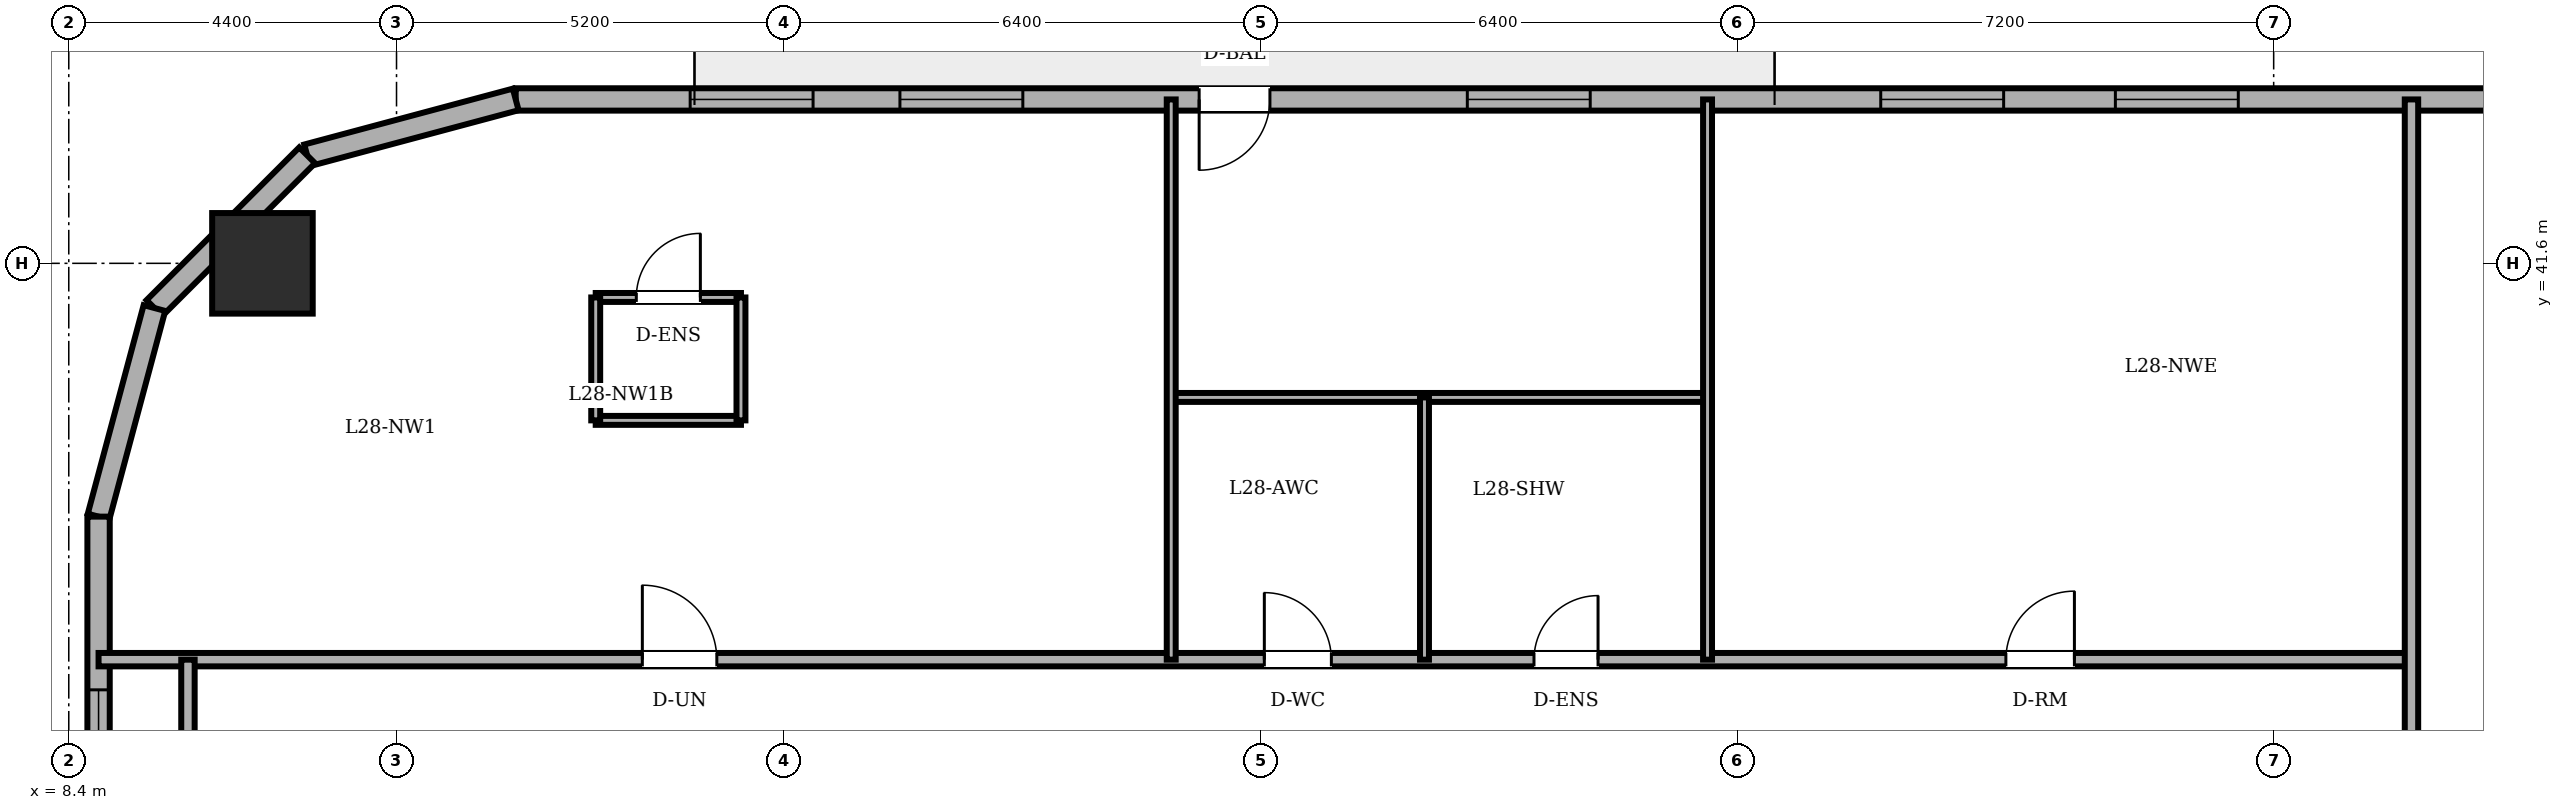
"""IFC4 building model, lengths in metres.
Left out: names, types, materials, properties, quantities, classifications, styles, units other than length and angle.
Written with IfcOpenShell. Run it as: python <this file> out.ifc"""

import sys

from ifc_helpers import new_model, si_unit, direction, frame, frame_2d, origin, origin_2d, place, context, subcontext, project, spatial, rectangle, circle, extrude, element, fill, save


model = new_model("IFC4")
c1 = context("Model", 3, precision=1e-05, world=origin(), true_north=direction((0.0, 1.0)))
c2 = subcontext(c1, "Body", "Model", "MODEL_VIEW")
j1 = project(units=[si_unit("LENGTHUNIT", "METRE"), si_unit("PLANEANGLEUNIT", "RADIAN")], contexts=[c1])
p1 = place(None, origin())
s1 = spatial("IfcSite", under=j1, at=p1, CompositionType="ELEMENT")
p2 = place(p1, origin())
s2 = spatial("IfcBuilding", under=s1, at=p2, CompositionType="ELEMENT")
p3 = place(p2, frame((0.0, 0.0, 107.9)))
s3 = spatial("IfcBuildingStorey", under=s2, at=p3, CompositionType="ELEMENT", Elevation=107.9)
p4 = place(p3, frame((11.0, 41.6, 0.0), z_axis=(0.0, 0.0, 1.0), x_axis=(1.0, 0.0, 0.0)))
e1 = element("IfcColumn", 1, at=p4, inside=s3, PredefinedType="COLUMN", context=c2, shape_type="SweptSolid", body=[
    extrude(circle(Radius=0.675, at=origin_2d()), origin(), (0.0, 0.0, 1.0), 3.6),
])
p5 = place(p3, frame((44.333, 43.8, 0.0), z_axis=(0.0, 0.0, 1.0), x_axis=(-1.0, 0.0, 0.0)))
e2 = element("IfcWall", 2, at=p5, inside=s3, PredefinedType="SOLIDWALL", context=c2, shape_type="SweptSolid", body=[
    extrude(rectangle(XDim=29.933, YDim=0.3, at=frame_2d((14.967, 0.0))), origin(), (0.0, 0.0, 1.0), 3.4),
])
p6 = place(p5, frame((19.808, 0.0, 0.0)))
e3 = element("IfcOpeningElement", 3, at=p6, cuts=e2, PredefinedType="OPENING", context=c2, shape_type="SweptSolid", body=[
    extrude(rectangle(XDim=0.95, YDim=2.2, at=frame_2d((0.475, 1.1))), frame((0.0, 0.16, 0.0), z_axis=(0.0, -1.0, 0.0), x_axis=(1.0, 0.0, 0.0)), (0.0, 0.0, 1.0), 0.32),
])
p7 = place(p5, frame((1.591, 0.0, 0.85)))
e4 = element("IfcOpeningElement", 4, at=p7, cuts=e2, PredefinedType="OPENING", context=c2, shape_type="SweptSolid", body=[
    extrude(rectangle(XDim=1.65, YDim=1.55, at=frame_2d((0.825, 0.775))), frame((0.0, 0.16, 0.0), z_axis=(0.0, -1.0, 0.0), x_axis=(1.0, 0.0, 0.0)), (0.0, 0.0, 1.0), 0.32),
])
p8 = place(p5, frame((6.808, 0.0, 0.85)))
e5 = element("IfcOpeningElement", 5, at=p8, cuts=e2, PredefinedType="OPENING", context=c2, shape_type="SweptSolid", body=[
    extrude(rectangle(XDim=1.65, YDim=1.55, at=frame_2d((0.825, 0.775))), frame((0.0, 0.16, 0.0), z_axis=(0.0, -1.0, 0.0), x_axis=(1.0, 0.0, 0.0)), (0.0, 0.0, 1.0), 0.32),
])
p9 = place(p5, frame((9.958, 0.0, 0.85)))
e6 = element("IfcOpeningElement", 6, at=p9, cuts=e2, PredefinedType="OPENING", context=c2, shape_type="SweptSolid", body=[
    extrude(rectangle(XDim=1.65, YDim=1.55, at=frame_2d((0.825, 0.775))), frame((0.0, 0.16, 0.0), z_axis=(0.0, -1.0, 0.0), x_axis=(1.0, 0.0, 0.0)), (0.0, 0.0, 1.0), 0.32),
])
p10 = place(p5, frame((15.508, 0.0, 0.85)))
e7 = element("IfcOpeningElement", 7, at=p10, cuts=e2, PredefinedType="OPENING", context=c2, shape_type="SweptSolid", body=[
    extrude(rectangle(XDim=1.65, YDim=1.55, at=frame_2d((0.825, 0.775))), frame((0.0, 0.16, 0.0), z_axis=(0.0, -1.0, 0.0), x_axis=(1.0, 0.0, 0.0)), (0.0, 0.0, 1.0), 0.32),
])
p11 = place(p5, frame((23.125, 0.0, 0.85)))
e8 = element("IfcOpeningElement", 8, at=p11, cuts=e2, PredefinedType="OPENING", context=c2, shape_type="SweptSolid", body=[
    extrude(rectangle(XDim=1.65, YDim=1.55, at=frame_2d((0.825, 0.775))), frame((0.0, 0.16, 0.0), z_axis=(0.0, -1.0, 0.0), x_axis=(1.0, 0.0, 0.0)), (0.0, 0.0, 1.0), 0.32),
])
p12 = place(p5, frame((25.941, 0.0, 0.85)))
e9 = element("IfcOpeningElement", 9, at=p12, cuts=e2, PredefinedType="OPENING", context=c2, shape_type="SweptSolid", body=[
    extrude(rectangle(XDim=1.65, YDim=1.55, at=frame_2d((0.825, 0.775))), frame((0.0, 0.16, 0.0), z_axis=(0.0, -1.0, 0.0), x_axis=(1.0, 0.0, 0.0)), (0.0, 0.0, 1.0), 0.32),
])
p13 = place(p3, frame((14.4, 43.8, 0.0), z_axis=(0.0, 0.0, 1.0), x_axis=(-0.965943540406, -0.258752926066, 0.0)))
e10 = element("IfcWall", 10, at=p13, inside=s3, PredefinedType="SOLIDWALL", context=c2, shape_type="SweptSolid", body=[
    extrude(rectangle(XDim=2.898, YDim=0.3, at=frame_2d((1.449, 0.0))), origin(), (0.0, 0.0, 1.0), 3.4),
])
p14 = place(p3, frame((11.6, 43.05, 0.0), z_axis=(0.0, 0.0, 1.0), x_axis=(-0.707106781187, -0.707106781187, 0.0)))
e11 = element("IfcWall", 11, at=p14, inside=s3, PredefinedType="SOLIDWALL", context=c2, shape_type="SweptSolid", body=[
    extrude(rectangle(XDim=2.899, YDim=0.3, at=frame_2d((1.45, 0.0))), origin(), (0.0, 0.0, 1.0), 3.4),
])
p15 = place(p3, frame((9.55, 41.0, 0.0), z_axis=(0.0, 0.0, 1.0), x_axis=(-0.258731875344, -0.96594917914, 0.0)))
e12 = element("IfcWall", 12, at=p15, inside=s3, PredefinedType="SOLIDWALL", context=c2, shape_type="SweptSolid", body=[
    extrude(rectangle(XDim=2.899, YDim=0.3, at=frame_2d((1.449, 0.0))), origin(), (0.0, 0.0, 1.0), 3.4),
])
p16 = place(p3, frame((8.8, 38.2, 0.0), z_axis=(0.0, 0.0, 1.0), x_axis=(0.0, -1.0, 0.0)))
e13 = element("IfcWall", 13, at=p16, inside=s3, PredefinedType="SOLIDWALL", context=c2, shape_type="SweptSolid", body=[
    extrude(rectangle(XDim=28.4, YDim=0.3, at=frame_2d((14.2, 0.0))), origin(), (0.0, 0.0, 1.0), 3.4),
])
p17 = place(p16, frame((2.325, 0.0, 0.85)))
e14 = element("IfcOpeningElement", 14, at=p17, cuts=e13, PredefinedType="OPENING", context=c2, shape_type="SweptSolid", body=[
    extrude(rectangle(XDim=1.65, YDim=1.55, at=frame_2d((0.825, 0.775))), frame((0.0, 0.16, 0.0), z_axis=(0.0, -1.0, 0.0), x_axis=(1.0, 0.0, 0.0)), (0.0, 0.0, 1.0), 0.32),
])
p18 = place(p16, frame((7.328, 0.0, 0.85)))
e15 = element("IfcOpeningElement", 15, at=p18, cuts=e13, PredefinedType="OPENING", context=c2, shape_type="SweptSolid", body=[
    extrude(rectangle(XDim=1.65, YDim=1.55, at=frame_2d((0.825, 0.775))), frame((0.0, 0.16, 0.0), z_axis=(0.0, -1.0, 0.0), x_axis=(1.0, 0.0, 0.0)), (0.0, 0.0, 1.0), 0.32),
])
p19 = place(p16, frame((11.102, 0.0, 0.85)))
e16 = element("IfcOpeningElement", 16, at=p19, cuts=e13, PredefinedType="OPENING", context=c2, shape_type="SweptSolid", body=[
    extrude(rectangle(XDim=1.65, YDim=1.55, at=frame_2d((0.825, 0.775))), frame((0.0, 0.16, 0.0), z_axis=(0.0, -1.0, 0.0), x_axis=(1.0, 0.0, 0.0)), (0.0, 0.0, 1.0), 0.32),
])
p20 = place(p16, frame((17.648, 0.0, 0.85)))
e17 = element("IfcOpeningElement", 17, at=p20, cuts=e13, PredefinedType="OPENING", context=c2, shape_type="SweptSolid", body=[
    extrude(rectangle(XDim=1.65, YDim=1.55, at=frame_2d((0.825, 0.775))), frame((0.0, 0.16, 0.0), z_axis=(0.0, -1.0, 0.0), x_axis=(1.0, 0.0, 0.0)), (0.0, 0.0, 1.0), 0.32),
])
p21 = place(p16, frame((20.422, 0.0, 0.85)))
e18 = element("IfcOpeningElement", 18, at=p21, cuts=e13, PredefinedType="OPENING", context=c2, shape_type="SweptSolid", body=[
    extrude(rectangle(XDim=1.65, YDim=1.55, at=frame_2d((0.825, 0.775))), frame((0.0, 0.16, 0.0), z_axis=(0.0, -1.0, 0.0), x_axis=(1.0, 0.0, 0.0)), (0.0, 0.0, 1.0), 0.32),
])
p22 = place(p16, frame((24.425, 0.0, 0.85)))
e19 = element("IfcOpeningElement", 19, at=p22, cuts=e13, PredefinedType="OPENING", context=c2, shape_type="SweptSolid", body=[
    extrude(rectangle(XDim=1.65, YDim=1.55, at=frame_2d((0.825, 0.775))), frame((0.0, 0.16, 0.0), z_axis=(0.0, -1.0, 0.0), x_axis=(1.0, 0.0, 0.0)), (0.0, 0.0, 1.0), 0.32),
])
p23 = place(p3, frame((15.474, 41.142, 0.0), z_axis=(0.0, 0.0, 1.0), x_axis=(1.0, 0.0, 0.0)))
e20 = element("IfcWall", 20, at=p23, inside=s3, PredefinedType="PARTITIONING", context=c2, shape_type="SweptSolid", body=[
    extrude(rectangle(XDim=1.95, YDim=0.12, at=frame_2d((0.975, 0.0))), origin(), (0.0, 0.0, 1.0), 3.4),
])
p24 = place(p23, frame((0.545, 0.0, 0.0)))
e21 = element("IfcOpeningElement", 21, at=p24, cuts=e20, PredefinedType="OPENING", context=c2, shape_type="SweptSolid", body=[
    extrude(rectangle(XDim=0.86, YDim=2.1, at=frame_2d((0.43, 1.05))), frame((0.0, 0.07, 0.0), z_axis=(0.0, -1.0, 0.0), x_axis=(1.0, 0.0, 0.0)), (0.0, 0.0, 1.0), 0.14),
])
p25 = place(p3, frame((17.424, 39.492, 0.0), z_axis=(0.0, 0.0, 1.0), x_axis=(-1.0, 0.0, 0.0)))
e22 = element("IfcWall", 22, at=p25, inside=s3, PredefinedType="PARTITIONING", context=c2, shape_type="SweptSolid", body=[
    extrude(rectangle(XDim=1.95, YDim=0.12, at=frame_2d((0.975, 0.0))), origin(), (0.0, 0.0, 1.0), 3.4),
])
for number, where, z_axis, x_axis in (
    (23, (15.474, 41.142, 0.0), (0.0, 0.0, 1.0), (0.0, -1.0, 0.0)),
    (24, (17.424, 39.492, 0.0), (0.0, 0.0, 1.0), (0.0, 1.0, 0.0)),
):
    element("IfcWall", number, at=place(p3, frame(where, z_axis=z_axis, x_axis=x_axis)), inside=s3, PredefinedType="PARTITIONING", context=c2, shape_type="SweptSolid", body=[
        extrude(rectangle(XDim=1.65, YDim=0.12, at=frame_2d((0.825, 0.0))), origin(), (0.0, 0.0, 1.0), 3.4),
    ])
p26 = place(p3, frame((8.8, 36.28, 0.0), z_axis=(0.0, 0.0, 1.0), x_axis=(1.0, 0.0, 0.0)))
e25 = element("IfcWall", 25, at=p26, inside=s3, PredefinedType="PARTITIONING", context=c2, shape_type="SweptSolid", body=[
    extrude(rectangle(XDim=31.05, YDim=0.18, at=frame_2d((15.525, 0.0))), origin(), (0.0, 0.0, 1.0), 3.4),
])
p27 = place(p26, frame((15.65, 0.0, 0.0)))
e26 = element("IfcOpeningElement", 26, at=p27, cuts=e25, PredefinedType="OPENING", context=c2, shape_type="SweptSolid", body=[
    extrude(rectangle(XDim=0.9, YDim=2.1, at=frame_2d((0.45, 1.05))), frame((0.0, 0.1, 0.0), z_axis=(0.0, -1.0, 0.0), x_axis=(1.0, 0.0, 0.0)), (0.0, 0.0, 1.0), 0.2),
])
p28 = place(p26, frame((19.27, 0.0, 0.0)))
e27 = element("IfcOpeningElement", 27, at=p28, cuts=e25, PredefinedType="OPENING", context=c2, shape_type="SweptSolid", body=[
    extrude(rectangle(XDim=0.86, YDim=2.1, at=frame_2d((0.43, 1.05))), frame((0.0, 0.1, 0.0), z_axis=(0.0, -1.0, 0.0), x_axis=(1.0, 0.0, 0.0)), (0.0, 0.0, 1.0), 0.2),
])
p29 = place(p26, frame((7.3, 0.0, 0.0)))
e28 = element("IfcOpeningElement", 28, at=p29, cuts=e25, PredefinedType="OPENING", context=c2, shape_type="SweptSolid", body=[
    extrude(rectangle(XDim=1.0, YDim=2.15, at=frame_2d((0.5, 1.075))), frame((0.0, 0.1, 0.0), z_axis=(0.0, -1.0, 0.0), x_axis=(1.0, 0.0, 0.0)), (0.0, 0.0, 1.0), 0.2),
])
p30 = place(p26, frame((25.605, 0.0, 0.0)))
e29 = element("IfcOpeningElement", 29, at=p30, cuts=e25, PredefinedType="OPENING", context=c2, shape_type="SweptSolid", body=[
    extrude(rectangle(XDim=0.92, YDim=2.1, at=frame_2d((0.46, 1.05))), frame((0.0, 0.1, 0.0), z_axis=(0.0, -1.0, 0.0), x_axis=(1.0, 0.0, 0.0)), (0.0, 0.0, 1.0), 0.2),
])
p31 = place(p3, frame((23.2, 39.8, 0.0), z_axis=(0.0, 0.0, 1.0), x_axis=(1.0, 0.0, 0.0)))
e30 = element("IfcWall", 30, at=p31, inside=s3, PredefinedType="PARTITIONING", context=c2, shape_type="SweptSolid", body=[
    extrude(rectangle(XDim=7.2, YDim=0.12, at=frame_2d((3.6, 0.0))), origin(), (0.0, 0.0, 1.0), 3.4),
])
p32 = place(p3, frame((10.0, 33.82, 0.0), z_axis=(0.0, 0.0, 1.0), x_axis=(0.0, 1.0, 0.0)))
e31 = element("IfcWall", 31, at=p32, inside=s3, PredefinedType="PARTITIONING", context=c2, shape_type="SweptSolid", body=[
    extrude(rectangle(XDim=2.46, YDim=0.18, at=frame_2d((1.23, 0.0))), origin(), (0.0, 0.0, 1.0), 3.4),
])
p33 = place(p3, frame((23.2, 36.28, 0.0), z_axis=(0.0, 0.0, 1.0), x_axis=(0.0, 1.0, 0.0)))
e32 = element("IfcWall", 32, at=p33, inside=s3, PredefinedType="PARTITIONING", context=c2, shape_type="SweptSolid", body=[
    extrude(rectangle(XDim=7.52, YDim=0.12, at=frame_2d((3.76, 0.0))), origin(), (0.0, 0.0, 1.0), 3.4),
])
p34 = place(p3, frame((26.6, 36.28, 0.0), z_axis=(0.0, 0.0, 1.0), x_axis=(0.0, 1.0, 0.0)))
e33 = element("IfcWall", 33, at=p34, inside=s3, PredefinedType="PARTITIONING", context=c2, shape_type="SweptSolid", body=[
    extrude(rectangle(XDim=3.52, YDim=0.12, at=frame_2d((1.76, 0.0))), origin(), (0.0, 0.0, 1.0), 3.4),
])
p35 = place(p3, frame((30.4, 36.28, 0.0), z_axis=(0.0, 0.0, 1.0), x_axis=(0.0, 1.0, 0.0)))
e34 = element("IfcWall", 34, at=p35, inside=s3, PredefinedType="PARTITIONING", context=c2, shape_type="SweptSolid", body=[
    extrude(rectangle(XDim=7.52, YDim=0.12, at=frame_2d((3.76, 0.0))), origin(), (0.0, 0.0, 1.0), 3.4),
])
p36 = place(p3, frame((39.85, 25.18, 0.0), z_axis=(0.0, 0.0, 1.0), x_axis=(0.0, 1.0, 0.0)))
e35 = element("IfcWall", 35, at=p36, inside=s3, PredefinedType="PARTITIONING", context=c2, shape_type="SweptSolid", body=[
    extrude(rectangle(XDim=18.62, YDim=0.18, at=frame_2d((9.31, 0.0))), origin(), (0.0, 0.0, 1.0), 3.4),
])
p37 = place(p36, frame((5.35, 0.0, 0.0)))
e36 = element("IfcOpeningElement", 36, at=p37, cuts=e35, PredefinedType="OPENING", context=c2, shape_type="SweptSolid", body=[
    extrude(rectangle(XDim=0.92, YDim=2.1, at=frame_2d((0.46, 1.05))), frame((0.0, 0.1, 0.0), z_axis=(0.0, -1.0, 0.0), x_axis=(1.0, 0.0, 0.0)), (0.0, 0.0, 1.0), 0.2),
])
p38 = place(p6, origin())
e37 = element("IfcDoor", 37, at=p38, inside=s3, OperationType="SINGLE_SWING_RIGHT", PredefinedType="DOOR", context=c2, shape_type="SweptSolid", body=[
    extrude(rectangle(XDim=0.95, YDim=2.2, at=frame_2d((0.475, 1.1))), frame((0.0, 0.025, 0.0), z_axis=(0.0, -1.0, 0.0), x_axis=(1.0, 0.0, 0.0)), (0.0, 0.0, 1.0), 0.05),
])
fill(e3, e37)
p39 = place(p8, origin())
e38 = element("IfcWindow", 38, at=p39, inside=s3, PartitioningType="DOUBLE_PANEL_VERTICAL", PredefinedType="WINDOW", context=c2, shape_type="SweptSolid", body=[
    extrude(rectangle(XDim=1.65, YDim=1.55, at=frame_2d((0.825, 0.775))), frame((0.0, 0.03, 0.0), z_axis=(0.0, -1.0, 0.0), x_axis=(1.0, 0.0, 0.0)), (0.0, 0.0, 1.0), 0.06),
])
fill(e5, e38)
p40 = place(p9, origin())
e39 = element("IfcWindow", 39, at=p40, inside=s3, PartitioningType="DOUBLE_PANEL_VERTICAL", PredefinedType="WINDOW", context=c2, shape_type="SweptSolid", body=[
    extrude(rectangle(XDim=1.65, YDim=1.55, at=frame_2d((0.825, 0.775))), frame((0.0, 0.03, 0.0), z_axis=(0.0, -1.0, 0.0), x_axis=(1.0, 0.0, 0.0)), (0.0, 0.0, 1.0), 0.06),
])
fill(e6, e39)
p41 = place(p10, origin())
e40 = element("IfcWindow", 40, at=p41, inside=s3, PartitioningType="DOUBLE_PANEL_VERTICAL", PredefinedType="WINDOW", context=c2, shape_type="SweptSolid", body=[
    extrude(rectangle(XDim=1.65, YDim=1.55, at=frame_2d((0.825, 0.775))), frame((0.0, 0.03, 0.0), z_axis=(0.0, -1.0, 0.0), x_axis=(1.0, 0.0, 0.0)), (0.0, 0.0, 1.0), 0.06),
])
fill(e7, e40)
p42 = place(p11, origin())
e41 = element("IfcWindow", 41, at=p42, inside=s3, PartitioningType="DOUBLE_PANEL_VERTICAL", PredefinedType="WINDOW", context=c2, shape_type="SweptSolid", body=[
    extrude(rectangle(XDim=1.65, YDim=1.55, at=frame_2d((0.825, 0.775))), frame((0.0, 0.03, 0.0), z_axis=(0.0, -1.0, 0.0), x_axis=(1.0, 0.0, 0.0)), (0.0, 0.0, 1.0), 0.06),
])
fill(e8, e41)
p43 = place(p12, origin())
e42 = element("IfcWindow", 42, at=p43, inside=s3, PartitioningType="DOUBLE_PANEL_VERTICAL", PredefinedType="WINDOW", context=c2, shape_type="SweptSolid", body=[
    extrude(rectangle(XDim=1.65, YDim=1.55, at=frame_2d((0.825, 0.775))), frame((0.0, 0.03, 0.0), z_axis=(0.0, -1.0, 0.0), x_axis=(1.0, 0.0, 0.0)), (0.0, 0.0, 1.0), 0.06),
])
fill(e9, e42)
p44 = place(p17, origin())
e43 = element("IfcWindow", 43, at=p44, inside=s3, PartitioningType="DOUBLE_PANEL_VERTICAL", PredefinedType="WINDOW", context=c2, shape_type="SweptSolid", body=[
    extrude(rectangle(XDim=1.65, YDim=1.55, at=frame_2d((0.825, 0.775))), frame((0.0, 0.03, 0.0), z_axis=(0.0, -1.0, 0.0), x_axis=(1.0, 0.0, 0.0)), (0.0, 0.0, 1.0), 0.06),
])
fill(e14, e43)
p45 = place(p24, origin())
e44 = element("IfcDoor", 44, at=p45, inside=s3, OperationType="SINGLE_SWING_RIGHT", PredefinedType="DOOR", context=c2, shape_type="SweptSolid", body=[
    extrude(rectangle(XDim=0.86, YDim=2.1, at=frame_2d((0.43, 1.05))), frame((0.0, 0.025, 0.0), z_axis=(0.0, -1.0, 0.0), x_axis=(1.0, 0.0, 0.0)), (0.0, 0.0, 1.0), 0.05),
])
fill(e21, e44)
p46 = place(p27, origin())
e45 = element("IfcDoor", 45, at=p46, inside=s3, OperationType="SINGLE_SWING_LEFT", PredefinedType="DOOR", context=c2, shape_type="SweptSolid", body=[
    extrude(rectangle(XDim=0.9, YDim=2.1, at=frame_2d((0.45, 1.05))), frame((0.0, 0.025, 0.0), z_axis=(0.0, -1.0, 0.0), x_axis=(1.0, 0.0, 0.0)), (0.0, 0.0, 1.0), 0.05),
])
fill(e26, e45)
p47 = place(p28, origin())
e46 = element("IfcDoor", 46, at=p47, inside=s3, OperationType="SINGLE_SWING_RIGHT", PredefinedType="DOOR", context=c2, shape_type="SweptSolid", body=[
    extrude(rectangle(XDim=0.86, YDim=2.1, at=frame_2d((0.43, 1.05))), frame((0.0, 0.025, 0.0), z_axis=(0.0, -1.0, 0.0), x_axis=(1.0, 0.0, 0.0)), (0.0, 0.0, 1.0), 0.05),
])
fill(e27, e46)
p48 = place(p29, origin())
e47 = element("IfcDoor", 47, at=p48, inside=s3, OperationType="SINGLE_SWING_LEFT", PredefinedType="DOOR", context=c2, shape_type="SweptSolid", body=[
    extrude(rectangle(XDim=1.0, YDim=2.15, at=frame_2d((0.5, 1.075))), frame((0.0, 0.025, 0.0), z_axis=(0.0, -1.0, 0.0), x_axis=(1.0, 0.0, 0.0)), (0.0, 0.0, 1.0), 0.05),
])
fill(e28, e47)
p49 = place(p30, origin())
e48 = element("IfcDoor", 48, at=p49, inside=s3, OperationType="SINGLE_SWING_RIGHT", PredefinedType="DOOR", context=c2, shape_type="SweptSolid", body=[
    extrude(rectangle(XDim=0.92, YDim=2.1, at=frame_2d((0.46, 1.05))), frame((0.0, 0.025, 0.0), z_axis=(0.0, -1.0, 0.0), x_axis=(1.0, 0.0, 0.0)), (0.0, 0.0, 1.0), 0.05),
])
fill(e29, e48)
save(model, sys.argv[1])
